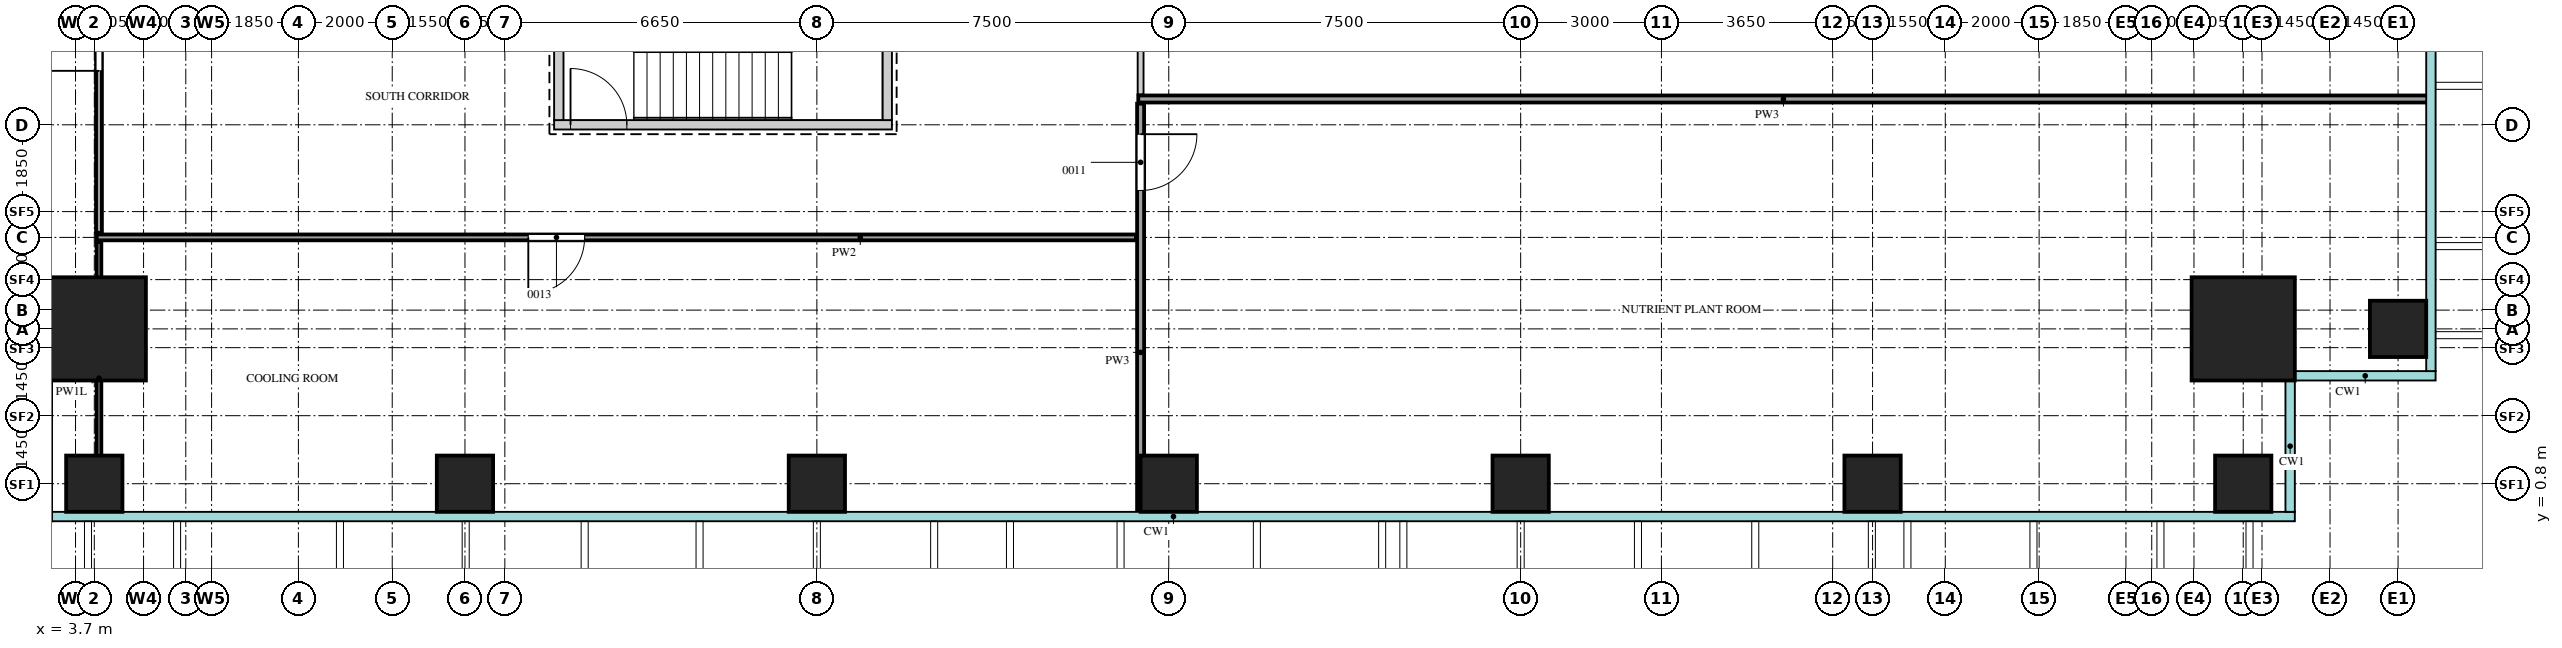
"""IFC4 building model, lengths in metres.
Left out: names, types, materials, properties, quantities, classifications, styles, units other than length and angle.
Written with IfcOpenShell. Run it as: python <this file> out.ifc"""

import sys

from ifc_helpers import new_model, si_unit, direction, frame, frame_2d, origin, origin_2d, place, context, subcontext, project, spatial, rectangle, extrude, source, transform, mapped, element, fill, save


model = new_model("IFC4")
c1 = context("Model", 3, precision=1e-05, world=origin(), true_north=direction((0.0, 1.0)))
c2 = subcontext(c1, "Body", "Model", "MODEL_VIEW")
j1 = project(units=[si_unit("LENGTHUNIT", "METRE"), si_unit("PLANEANGLEUNIT", "RADIAN")], contexts=[c1])
p1 = place(None, origin())
s1 = spatial("IfcSite", under=j1, at=p1, CompositionType="ELEMENT")
p2 = place(p1, origin())
s2 = spatial("IfcBuilding", under=s1, at=p2, CompositionType="ELEMENT")
p3 = place(p2, frame((0.0, 0.0, 73.5)))
s3 = spatial("IfcBuildingStorey", under=s2, at=p3, CompositionType="ELEMENT", Elevation=73.5)
m1 = source(origin(), c2, "Body", "SweptSolid", [
    extrude(rectangle(XDim=7.2, YDim=0.2, at=frame_2d((3.6, 0.0))), origin(), (0.0, 0.0, 1.0), 4.2),
])
p4 = place(p3, frame((13.9, 8.45, 0.0), z_axis=(0.0, 0.0, 1.0), x_axis=(1.0, 0.0, 0.0)))
e1 = element("IfcWall", 1, at=p4, inside=s3, PredefinedType="SHEAR", context=c2, shape_type="MappedRepresentation", body=[
    mapped(m1, transform((0.0, 0.0, 0.0))),
])
m2 = source(origin(), c2, "Body", "SweptSolid", [
    extrude(rectangle(XDim=1.2, YDim=2.1, at=frame_2d((0.6, 1.05))), frame((0.0, 0.11, 0.0), z_axis=(0.0, -1.0, 0.0), x_axis=(1.0, 0.0, 0.0)), (0.0, 0.0, 1.0), 0.22),
])
p5 = place(p4, frame((0.35, 0.0, 0.0)))
e2 = element("IfcOpeningElement", 2, at=p5, cuts=e1, PredefinedType="OPENING", context=c2, shape_type="MappedRepresentation", body=[
    mapped(m2, transform((0.0, 0.0, 0.0))),
])
m3 = source(origin(), c2, "Body", "SweptSolid", [
    extrude(rectangle(XDim=3.35, YDim=0.2, at=frame_2d((1.675, 0.0))), origin(), (0.0, 0.0, 1.0), 4.2),
])
for number, where, z_axis, x_axis in (
    (3, (21.0, 8.55, 0.0), (0.0, 0.0, 1.0), (0.0, 1.0, 0.0)),
    (4, (14.0, 8.55, 0.0), (0.0, 0.0, 1.0), (0.0, 1.0, 0.0)),
):
    element("IfcWall", number, at=place(p3, frame(where, z_axis=z_axis, x_axis=x_axis)), inside=s3, PredefinedType="SHEAR", context=c2, shape_type="MappedRepresentation", body=[
        mapped(m3, transform((0.0, 0.0, 0.0))),
    ])
m4 = source(origin(), c2, "Body", "SweptSolid", [
    extrude(rectangle(XDim=2.2, YDim=2.2, at=origin_2d()), origin(), (0.0, 0.0, 1.0), 4.5),
])
for number, where, z_axis, x_axis in (
    (5, (49.9, 4.1, 0.0), (0.0, 0.0, 1.0), (1.0, 0.0, 0.0)),
    (6, (4.1, 4.1, 0.0), (0.0, 0.0, 1.0), (1.0, 0.0, 0.0)),
):
    element("IfcColumn", number, at=place(p3, frame(where, z_axis=z_axis, x_axis=x_axis)), inside=s3, PredefinedType="COLUMN", context=c2, shape_type="MappedRepresentation", body=[
        mapped(m4, transform((0.0, 0.0, 0.0))),
    ])
m5 = source(origin(), c2, "Body", "SweptSolid", [
    extrude(rectangle(XDim=1.2, YDim=1.2, at=origin_2d()), origin(), (0.0, 0.0, 1.0), 4.2),
])
for number, where, z_axis, x_axis in (
    (7, (4.1, 0.8, 0.0), (0.0, 0.0, 1.0), (1.0, 0.0, 0.0)),
    (8, (12.0, 0.8, 0.0), (0.0, 0.0, 1.0), (1.0, 0.0, 0.0)),
    (9, (19.5, 0.8, 0.0), (0.0, 0.0, 1.0), (1.0, 0.0, 0.0)),
    (10, (27.0, 0.8, 0.0), (0.0, 0.0, 1.0), (1.0, 0.0, 0.0)),
    (11, (34.5, 0.8, 0.0), (0.0, 0.0, 1.0), (1.0, 0.0, 0.0)),
    (12, (42.0, 0.8, 0.0), (0.0, 0.0, 1.0), (1.0, 0.0, 0.0)),
    (13, (49.9, 0.8, 0.0), (0.0, 0.0, 1.0), (1.0, 0.0, 0.0)),
    (14, (53.2, 4.1, 0.0), (0.0, 0.0, 1.0), (1.0, 0.0, 0.0)),
):
    element("IfcColumn", number, at=place(p3, frame(where, z_axis=z_axis, x_axis=x_axis)), inside=s3, PredefinedType="COLUMN", context=c2, shape_type="MappedRepresentation", body=[
        mapped(m5, transform((0.0, 0.0, 0.0))),
    ])
m6 = source(origin(), c2, "Body", "SweptSolid", [
    extrude(rectangle(XDim=5.8, YDim=0.1, at=frame_2d((2.9, 0.0))), origin(), (0.0, 0.0, 1.0), 3.6),
])
p6 = place(p3, frame((4.2, 0.15, 0.0), z_axis=(0.0, 0.0, 1.0), x_axis=(0.0, 1.0, 0.0)))
e15 = element("IfcWall", 15, at=p6, inside=s3, PredefinedType="PARTITIONING", context=c2, shape_type="MappedRepresentation", body=[
    mapped(m6, transform((0.0, 0.0, 0.0))),
])
m7 = source(origin(), c2, "Body", "SweptSolid", [
    extrude(rectangle(XDim=8.75, YDim=0.15, at=frame_2d((4.375, 0.0))), origin(), (0.0, 0.0, 1.0), 4.3),
])
p7 = place(p3, frame((26.4, 0.15, 0.0), z_axis=(0.0, 0.0, 1.0), x_axis=(0.0, 1.0, 0.0)))
e16 = element("IfcWall", 16, at=p7, inside=s3, PredefinedType="PARTITIONING", context=c2, shape_type="MappedRepresentation", body=[
    mapped(m7, transform((0.0, 0.0, 0.0))),
])
m8 = source(origin(), c2, "Body", "SweptSolid", [
    extrude(rectangle(XDim=1.2, YDim=2.1, at=frame_2d((0.6, 1.05))), frame((0.0, 0.085, 0.0), z_axis=(0.0, -1.0, 0.0), x_axis=(1.0, 0.0, 0.0)), (0.0, 0.0, 1.0), 0.17),
])
p8 = place(p7, frame((6.9, 0.0, 0.0)))
e17 = element("IfcOpeningElement", 17, at=p8, cuts=e16, PredefinedType="OPENING", context=c2, shape_type="MappedRepresentation", body=[
    mapped(m8, transform((0.0, 0.0, 0.0))),
])
m9 = source(origin(), c2, "Body", "SweptSolid", [
    extrude(rectangle(XDim=22.15, YDim=0.125, at=frame_2d((11.075, 0.0))), origin(), (0.0, 0.0, 1.0), 4.3),
])
p9 = place(p3, frame((4.15, 6.05, 0.0), z_axis=(0.0, 0.0, 1.0), x_axis=(1.0, 0.0, 0.0)))
e18 = element("IfcWall", 18, at=p9, inside=s3, PredefinedType="PARTITIONING", context=c2, shape_type="MappedRepresentation", body=[
    mapped(m9, transform((0.0, 0.0, 0.0))),
])
m10 = source(origin(), c2, "Body", "SweptSolid", [
    extrude(rectangle(XDim=1.2, YDim=2.1, at=frame_2d((0.6, 1.05))), frame((0.0, 0.073, 0.0), z_axis=(0.0, -1.0, 0.0), x_axis=(1.0, 0.0, 0.0)), (0.0, 0.0, 1.0), 0.145),
])
p10 = place(p9, frame((9.2, 0.0, 0.0)))
e19 = element("IfcOpeningElement", 19, at=p10, cuts=e18, PredefinedType="OPENING", context=c2, shape_type="MappedRepresentation", body=[
    mapped(m10, transform((0.0, 0.0, 0.0))),
])
m11 = source(origin(), c2, "Body", "SweptSolid", [
    extrude(rectangle(XDim=41.8, YDim=0.125, at=frame_2d((20.9, 0.0))), origin(), (0.0, 0.0, 1.0), 4.3),
])
p11 = place(p3, frame((4.2, 6.15, 0.0), z_axis=(0.0, 0.0, 1.0), x_axis=(0.0, 1.0, 0.0)))
e20 = element("IfcWall", 20, at=p11, inside=s3, PredefinedType="PARTITIONING", context=c2, shape_type="MappedRepresentation", body=[
    mapped(m11, transform((0.0, 0.0, 0.0))),
])
p12 = place(p11, frame((3.45, 0.0, 0.0)))
e21 = element("IfcOpeningElement", 21, at=p12, cuts=e20, PredefinedType="OPENING", context=c2, shape_type="MappedRepresentation", body=[
    mapped(m10, transform((0.0, 0.0, 0.0))),
])
m12 = source(origin(), c2, "Body", "SweptSolid", [
    extrude(rectangle(XDim=0.9, YDim=2.1, at=frame_2d((0.45, 1.05))), frame((0.0, 0.073, 0.0), z_axis=(0.0, -1.0, 0.0), x_axis=(1.0, 0.0, 0.0)), (0.0, 0.0, 1.0), 0.145),
])
p13 = place(p11, frame((13.25, 0.0, 0.0)))
e22 = element("IfcOpeningElement", 22, at=p13, cuts=e20, PredefinedType="OPENING", context=c2, shape_type="MappedRepresentation", body=[
    mapped(m12, transform((0.0, 0.0, 0.0))),
])
p14 = place(p11, frame((30.35, 0.0, 0.0)))
e23 = element("IfcOpeningElement", 23, at=p14, cuts=e20, PredefinedType="OPENING", context=c2, shape_type="MappedRepresentation", body=[
    mapped(m12, transform((0.0, 0.0, 0.0))),
])
m13 = source(origin(), c2, "Body", "SweptSolid", [
    extrude(rectangle(XDim=27.5, YDim=0.15, at=frame_2d((13.75, 0.0))), origin(), (0.0, 0.0, 1.0), 4.3),
])
p15 = place(p3, frame((26.35, 9.0, 0.0), z_axis=(0.0, 0.0, 1.0), x_axis=(1.0, 0.0, 0.0)))
e24 = element("IfcWall", 24, at=p15, inside=s3, PredefinedType="PARTITIONING", context=c2, shape_type="MappedRepresentation", body=[
    mapped(m13, transform((0.0, 0.0, 0.0))),
])
m14 = source(origin(), c2, "Body", "SweptSolid", [
    extrude(rectangle(XDim=26.1, YDim=0.125, at=frame_2d((13.05, 0.0))), origin(), (0.0, 0.0, 1.0), 4.3),
])
p16 = place(p3, frame((26.4, 9.1, 0.0), z_axis=(0.0, 0.0, 1.0), x_axis=(0.0, 1.0, 0.0)))
e25 = element("IfcWall", 25, at=p16, inside=s3, PredefinedType="PARTITIONING", context=c2, shape_type="MappedRepresentation", body=[
    mapped(m14, transform((0.0, 0.0, 0.0))),
])
p17 = place(p16, frame((5.8, 0.0, 0.0)))
e26 = element("IfcOpeningElement", 26, at=p17, cuts=e25, PredefinedType="OPENING", context=c2, shape_type="MappedRepresentation", body=[
    mapped(m10, transform((0.0, 0.0, 0.0))),
])
m15 = source(origin(), c2, "Body", "SweptSolid", [
    extrude(rectangle(XDim=1.2, YDim=2.1, at=frame_2d((0.6, 1.05))), frame((0.0, 0.025, 0.0), z_axis=(0.0, -1.0, 0.0), x_axis=(1.0, 0.0, 0.0)), (0.0, 0.0, 1.0), 0.05),
])
p18 = place(p8, origin())
e27 = element("IfcDoor", 27, at=p18, inside=s3, OperationType="SINGLE_SWING_RIGHT", PredefinedType="DOOR", context=c2, shape_type="MappedRepresentation", body=[
    mapped(m15, transform((0.0, 0.0, 0.0))),
])
fill(e17, e27)
p19 = place(p12, origin())
e28 = element("IfcDoor", 28, at=p19, inside=s3, OperationType="SINGLE_SWING_RIGHT", PredefinedType="DOOR", context=c2, shape_type="MappedRepresentation", body=[
    mapped(m15, transform((0.0, 0.0, 0.0))),
])
fill(e21, e28)
p20 = place(p10, origin())
e29 = element("IfcDoor", 29, at=p20, inside=s3, OperationType="SINGLE_SWING_LEFT", PredefinedType="DOOR", context=c2, shape_type="MappedRepresentation", body=[
    mapped(m15, transform((0.0, 0.0, 0.0))),
])
fill(e19, e29)
p21 = place(p5, origin())
e30 = element("IfcDoor", 30, at=p21, inside=s3, OperationType="SINGLE_SWING_RIGHT", PredefinedType="DOOR", context=c2, shape_type="MappedRepresentation", body=[
    mapped(m15, transform((0.0, 0.0, 0.0))),
])
fill(e2, e30)
save(model, sys.argv[1])
